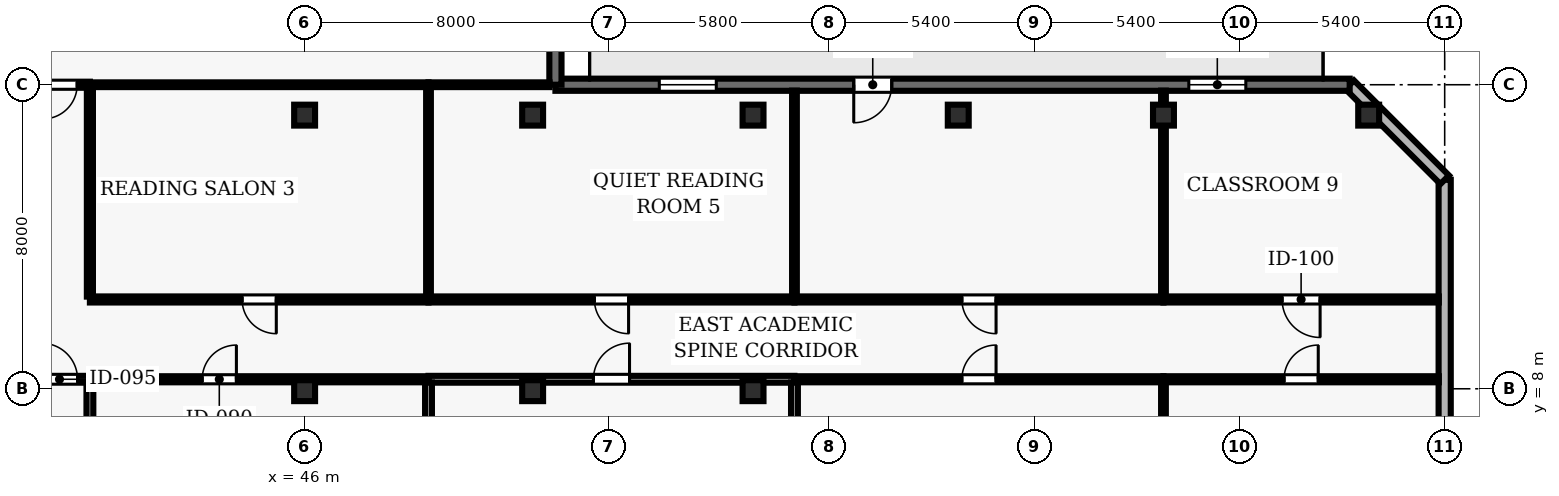
"""IFC4 building model, lengths in metres.
Left out: names, types, materials, properties, quantities, classifications, styles, units other than length and angle.
Written with IfcOpenShell. Run it as: python <this file> out.ifc"""

import sys

from ifc_helpers import new_model, si_unit, direction, frame, frame_2d, origin, origin_2d, place, context, subcontext, project, spatial, rectangle, hollow_rectangle, extrude, element, fill, save


model = new_model("IFC4")
c1 = context("Model", 3, precision=1e-05, world=origin(), true_north=direction((0.0, 1.0)))
c2 = subcontext(c1, "Body", "Model", "MODEL_VIEW")
j1 = project(units=[si_unit("LENGTHUNIT", "METRE"), si_unit("PLANEANGLEUNIT", "RADIAN")], contexts=[c1])
p1 = place(None, origin())
s1 = spatial("IfcSite", under=j1, at=p1, CompositionType="ELEMENT")
p2 = place(p1, origin())
s2 = spatial("IfcBuilding", under=s1, at=p2, CompositionType="ELEMENT")
p3 = place(p2, frame((0.0, 0.0, 58.3)))
s3 = spatial("IfcBuildingStorey", under=s2, at=p3, CompositionType="ELEMENT", Elevation=58.3)
for number, where, z_axis, x_axis in (
    (1, (46.0, 7.95, 0.0), (0.0, 0.0, 1.0), (1.0, 0.0, 0.0)),
    (2, (46.0, 15.2, 0.0), (0.0, 0.0, 1.0), (1.0, 0.0, 0.0)),
    (3, (52.0, 7.95, 0.0), (0.0, 0.0, 1.0), (1.0, 0.0, 0.0)),
    (4, (52.0, 15.2, 0.0), (0.0, 0.0, 1.0), (1.0, 0.0, 0.0)),
    (5, (57.8, 7.95, 0.0), (0.0, 0.0, 1.0), (1.0, 0.0, 0.0)),
    (6, (57.8, 15.2, 0.0), (0.0, 0.0, 1.0), (1.0, 0.0, 0.0)),
    (7, (63.2, 15.2, 0.0), (0.0, 0.0, 1.0), (1.0, 0.0, 0.0)),
    (8, (68.6, 15.2, 0.0), (0.0, 0.0, 1.0), (1.0, 0.0, 0.0)),
    (9, (74.0, 15.2, 0.0), (0.0, 0.0, 1.0), (1.0, 0.0, 0.0)),
):
    element("IfcColumn", number, at=place(p3, frame(where, z_axis=z_axis, x_axis=x_axis)), inside=s3, PredefinedType="COLUMN", context=c2, shape_type="SweptSolid", body=[
        extrude(hollow_rectangle(XDim=0.55, YDim=0.55, WallThickness=0.025, at=origin_2d()), origin(), (0.0, 0.0, 1.0), 3.9),
    ])
p4 = place(p3, frame((76.0, 2.5, 0.0), z_axis=(0.0, 0.0, 1.0), x_axis=(0.0, 1.0, 0.0)))
e10 = element("IfcWall", 10, at=p4, inside=s3, PredefinedType="SOLIDWALL", context=c2, shape_type="SweptSolid", body=[
    extrude(rectangle(XDim=11.0, YDim=0.32, at=frame_2d((5.5, 0.0))), origin(), (0.0, 0.0, 1.0), 3.69),
])
p5 = place(p4, frame((1.7, 0.0, 0.9)))
e11 = element("IfcOpeningElement", 11, at=p5, cuts=e10, PredefinedType="OPENING", context=c2, shape_type="SweptSolid", body=[
    extrude(rectangle(XDim=2.1, YDim=1.6, at=frame_2d((1.05, 0.8))), frame((0.0, 0.17, 0.0), z_axis=(0.0, -1.0, 0.0), x_axis=(1.0, 0.0, 0.0)), (0.0, 0.0, 1.0), 0.34),
])
p6 = place(p3, frame((76.0, 13.5, 0.0), z_axis=(0.0, 0.0, 1.0), x_axis=(-0.707106781187, 0.707106781187, 0.0)))
e12 = element("IfcWall", 12, at=p6, inside=s3, PredefinedType="SOLIDWALL", context=c2, shape_type="SweptSolid", body=[
    extrude(rectangle(XDim=3.536, YDim=0.32, at=frame_2d((1.768, 0.0))), origin(), (0.0, 0.0, 1.0), 3.69),
])
p7 = place(p3, frame((73.5, 16.0, 0.0), z_axis=(0.0, 0.0, 1.0), x_axis=(-1.0, 0.0, 0.0)))
e13 = element("IfcWall", 13, at=p7, inside=s3, PredefinedType="SOLIDWALL", context=c2, shape_type="SweptSolid", body=[
    extrude(rectangle(XDim=20.9, YDim=0.32, at=frame_2d((10.45, 0.0))), origin(), (0.0, 0.0, 1.0), 3.69),
])
p8 = place(p7, frame((12.05, 0.0, 0.0)))
e14 = element("IfcOpeningElement", 14, at=p8, cuts=e13, PredefinedType="OPENING", context=c2, shape_type="SweptSolid", body=[
    extrude(rectangle(XDim=1.0, YDim=2.2, at=frame_2d((0.5, 1.1))), frame((0.0, 0.17, 0.0), z_axis=(0.0, -1.0, 0.0), x_axis=(1.0, 0.0, 0.0)), (0.0, 0.0, 1.0), 0.34),
])
p9 = place(p7, frame((2.733, 0.0, 0.9)))
e15 = element("IfcOpeningElement", 15, at=p9, cuts=e13, PredefinedType="OPENING", context=c2, shape_type="SweptSolid", body=[
    extrude(rectangle(XDim=1.5, YDim=1.8, at=frame_2d((0.75, 0.9))), frame((0.0, 0.17, 0.0), z_axis=(0.0, -1.0, 0.0), x_axis=(1.0, 0.0, 0.0)), (0.0, 0.0, 1.0), 0.34),
])
p10 = place(p7, frame((16.667, 0.0, 0.9)))
e16 = element("IfcOpeningElement", 16, at=p10, cuts=e13, PredefinedType="OPENING", context=c2, shape_type="SweptSolid", body=[
    extrude(rectangle(XDim=1.5, YDim=1.8, at=frame_2d((0.75, 0.9))), frame((0.0, 0.17, 0.0), z_axis=(0.0, -1.0, 0.0), x_axis=(1.0, 0.0, 0.0)), (0.0, 0.0, 1.0), 0.34),
])
p11 = place(p3, frame((52.6, 16.0, 0.0), z_axis=(0.0, 0.0, 1.0), x_axis=(0.0, 1.0, 0.0)))
e17 = element("IfcWall", 17, at=p11, inside=s3, PredefinedType="SOLIDWALL", context=c2, shape_type="SweptSolid", body=[
    extrude(rectangle(XDim=10.095, YDim=0.32, at=frame_2d((5.047, 0.0))), origin(), (0.0, 0.0, 1.0), 3.69),
])
p12 = place(p11, frame((4.147, 0.0, 0.9)))
e18 = element("IfcOpeningElement", 18, at=p12, cuts=e17, PredefinedType="OPENING", context=c2, shape_type="SweptSolid", body=[
    extrude(rectangle(XDim=1.8, YDim=1.8, at=frame_2d((0.9, 0.9))), frame((0.0, 0.17, 0.0), z_axis=(0.0, -1.0, 0.0), x_axis=(1.0, 0.0, 0.0)), (0.0, 0.0, 1.0), 0.34),
])
p13 = place(p3, frame((38.05, 8.25, 0.0), z_axis=(0.0, 0.0, 1.0), x_axis=(1.0, 0.0, 0.0)))
e19 = element("IfcWall", 19, at=p13, inside=s3, PredefinedType="PARTITIONING", context=c2, shape_type="SweptSolid", body=[
    extrude(rectangle(XDim=2.3, YDim=0.18, at=frame_2d((1.15, 0.0))), origin(), (0.0, 0.0, 1.0), 3.055),
])
p14 = place(p13, frame((1.025, 0.0, 0.0)))
e20 = element("IfcOpeningElement", 20, at=p14, cuts=e19, PredefinedType="OPENING", context=c2, shape_type="SweptSolid", body=[
    extrude(rectangle(XDim=0.95, YDim=2.1, at=frame_2d((0.475, 1.05))), frame((0.0, 0.1, 0.0), z_axis=(0.0, -1.0, 0.0), x_axis=(1.0, 0.0, 0.0)), (0.0, 0.0, 1.0), 0.2),
])
p15 = place(p3, frame((40.35, 8.25, 0.0), z_axis=(0.0, 0.0, 1.0), x_axis=(1.0, 0.0, 0.0)))
e21 = element("IfcWall", 21, at=p15, inside=s3, PredefinedType="PARTITIONING", context=c2, shape_type="SweptSolid", body=[
    extrude(rectangle(XDim=8.91, YDim=0.16, at=frame_2d((4.455, 0.0))), origin(), (0.0, 0.0, 1.0), 3.055),
])
p16 = place(p15, frame((2.955, 0.0, 0.0)))
e22 = element("IfcOpeningElement", 22, at=p16, cuts=e21, PredefinedType="OPENING", context=c2, shape_type="SweptSolid", body=[
    extrude(rectangle(XDim=0.9, YDim=2.1, at=frame_2d((0.45, 1.05))), frame((0.0, 0.09, 0.0), z_axis=(0.0, -1.0, 0.0), x_axis=(1.0, 0.0, 0.0)), (0.0, 0.0, 1.0), 0.18),
])
p17 = place(p3, frame((40.35, 16.0, 0.0), z_axis=(0.0, 0.0, 1.0), x_axis=(-1.0, 0.0, 0.0)))
e23 = element("IfcWall", 23, at=p17, inside=s3, PredefinedType="PARTITIONING", context=c2, shape_type="SweptSolid", body=[
    extrude(rectangle(XDim=2.27, YDim=0.16, at=frame_2d((1.135, 0.0))), origin(), (0.0, 0.0, 1.0), 3.69),
])
p18 = place(p17, frame((0.335, 0.0, 0.0)))
e24 = element("IfcOpeningElement", 24, at=p18, cuts=e23, PredefinedType="OPENING", context=c2, shape_type="SweptSolid", body=[
    extrude(rectangle(XDim=0.9, YDim=2.1, at=frame_2d((0.45, 1.05))), frame((0.0, 0.09, 0.0), z_axis=(0.0, -1.0, 0.0), x_axis=(1.0, 0.0, 0.0)), (0.0, 0.0, 1.0), 0.18),
])
p19 = place(p3, frame((49.26, 8.25, 0.0), z_axis=(0.0, 0.0, 1.0), x_axis=(1.0, 0.0, 0.0)))
e25 = element("IfcWall", 25, at=p19, inside=s3, PredefinedType="PARTITIONING", context=c2, shape_type="SweptSolid", body=[
    extrude(rectangle(XDim=9.63, YDim=0.18, at=frame_2d((4.815, 0.0))), origin(), (0.0, 0.0, 1.0), 3.055),
])
p20 = place(p19, frame((4.34, 0.0, 0.0)))
e26 = element("IfcOpeningElement", 26, at=p20, cuts=e25, PredefinedType="OPENING", context=c2, shape_type="SweptSolid", body=[
    extrude(rectangle(XDim=0.95, YDim=2.1, at=frame_2d((0.475, 1.05))), frame((0.0, 0.1, 0.0), z_axis=(0.0, -1.0, 0.0), x_axis=(1.0, 0.0, 0.0)), (0.0, 0.0, 1.0), 0.2),
])
p21 = place(p3, frame((49.26, 10.35, 0.0), z_axis=(0.0, 0.0, 1.0), x_axis=(-1.0, 0.0, 0.0)))
e27 = element("IfcWall", 27, at=p21, inside=s3, PredefinedType="PARTITIONING", context=c2, shape_type="SweptSolid", body=[
    extrude(rectangle(XDim=8.91, YDim=0.16, at=frame_2d((4.455, 0.0))), origin(), (0.0, 0.0, 1.0), 3.277),
])
p22 = place(p21, frame((4.005, 0.0, 0.0)))
e28 = element("IfcOpeningElement", 28, at=p22, cuts=e27, PredefinedType="OPENING", context=c2, shape_type="SweptSolid", body=[
    extrude(rectangle(XDim=0.9, YDim=2.1, at=frame_2d((0.45, 1.05))), frame((0.0, 0.09, 0.0), z_axis=(0.0, -1.0, 0.0), x_axis=(1.0, 0.0, 0.0)), (0.0, 0.0, 1.0), 0.18),
])
p23 = place(p3, frame((49.26, 16.0, 0.0), z_axis=(0.0, 0.0, 1.0), x_axis=(1.0, 0.0, 0.0)))
e29 = element("IfcWall", 29, at=p23, inside=s3, PredefinedType="PARTITIONING", context=c2, shape_type="SweptSolid", body=[
    extrude(rectangle(XDim=3.185, YDim=0.125, at=frame_2d((1.593, 0.0))), origin(), (0.0, 0.0, 1.0), 3.39),
])
p24 = place(p3, frame((49.26, 16.0, 0.0), z_axis=(0.0, 0.0, 1.0), x_axis=(-1.0, 0.0, 0.0)))
e30 = element("IfcWall", 30, at=p24, inside=s3, PredefinedType="PARTITIONING", context=c2, shape_type="SweptSolid", body=[
    extrude(rectangle(XDim=8.91, YDim=0.125, at=frame_2d((4.455, 0.0))), origin(), (0.0, 0.0, 1.0), 3.39),
])
p25 = place(p3, frame((58.89, 8.25, 0.0), z_axis=(0.0, 0.0, 1.0), x_axis=(1.0, 0.0, 0.0)))
e31 = element("IfcWall", 31, at=p25, inside=s3, PredefinedType="PARTITIONING", context=c2, shape_type="SweptSolid", body=[
    extrude(rectangle(XDim=9.71, YDim=0.16, at=frame_2d((4.855, 0.0))), origin(), (0.0, 0.0, 1.0), 3.69),
])
p26 = place(p25, frame((4.405, 0.0, 0.0)))
e32 = element("IfcOpeningElement", 32, at=p26, cuts=e31, PredefinedType="OPENING", context=c2, shape_type="SweptSolid", body=[
    extrude(rectangle(XDim=0.9, YDim=2.1, at=frame_2d((0.45, 1.05))), frame((0.0, 0.09, 0.0), z_axis=(0.0, -1.0, 0.0), x_axis=(1.0, 0.0, 0.0)), (0.0, 0.0, 1.0), 0.18),
])
p27 = place(p3, frame((58.89, 10.35, 0.0), z_axis=(0.0, 0.0, 1.0), x_axis=(-1.0, 0.0, 0.0)))
e33 = element("IfcWall", 33, at=p27, inside=s3, PredefinedType="PARTITIONING", context=c2, shape_type="SweptSolid", body=[
    extrude(rectangle(XDim=9.63, YDim=0.16, at=frame_2d((4.815, 0.0))), origin(), (0.0, 0.0, 1.0), 3.277),
])
p28 = place(p27, frame((4.365, 0.0, 0.0)))
e34 = element("IfcOpeningElement", 34, at=p28, cuts=e33, PredefinedType="OPENING", context=c2, shape_type="SweptSolid", body=[
    extrude(rectangle(XDim=0.9, YDim=2.1, at=frame_2d((0.45, 1.05))), frame((0.0, 0.09, 0.0), z_axis=(0.0, -1.0, 0.0), x_axis=(1.0, 0.0, 0.0)), (0.0, 0.0, 1.0), 0.18),
])
p29 = place(p3, frame((68.6, 8.25, 0.0), z_axis=(0.0, 0.0, 1.0), x_axis=(1.0, 0.0, 0.0)))
e35 = element("IfcWall", 35, at=p29, inside=s3, PredefinedType="PARTITIONING", context=c2, shape_type="SweptSolid", body=[
    extrude(rectangle(XDim=7.245, YDim=0.16, at=frame_2d((3.623, 0.0))), origin(), (0.0, 0.0, 1.0), 3.69),
])
p30 = place(p29, frame((3.173, 0.0, 0.0)))
e36 = element("IfcOpeningElement", 36, at=p30, cuts=e35, PredefinedType="OPENING", context=c2, shape_type="SweptSolid", body=[
    extrude(rectangle(XDim=0.9, YDim=2.1, at=frame_2d((0.45, 1.05))), frame((0.0, 0.09, 0.0), z_axis=(0.0, -1.0, 0.0), x_axis=(1.0, 0.0, 0.0)), (0.0, 0.0, 1.0), 0.18),
])
p31 = place(p3, frame((68.6, 10.35, 0.0), z_axis=(0.0, 0.0, 1.0), x_axis=(-1.0, 0.0, 0.0)))
e37 = element("IfcWall", 37, at=p31, inside=s3, PredefinedType="PARTITIONING", context=c2, shape_type="SweptSolid", body=[
    extrude(rectangle(XDim=9.71, YDim=0.16, at=frame_2d((4.855, 0.0))), origin(), (0.0, 0.0, 1.0), 3.277),
])
p32 = place(p31, frame((4.405, 0.0, 0.0)))
e38 = element("IfcOpeningElement", 38, at=p32, cuts=e37, PredefinedType="OPENING", context=c2, shape_type="SweptSolid", body=[
    extrude(rectangle(XDim=0.9, YDim=2.1, at=frame_2d((0.45, 1.05))), frame((0.0, 0.09, 0.0), z_axis=(0.0, -1.0, 0.0), x_axis=(1.0, 0.0, 0.0)), (0.0, 0.0, 1.0), 0.18),
])
p33 = place(p3, frame((75.845, 10.35, 0.0), z_axis=(0.0, 0.0, 1.0), x_axis=(-1.0, 0.0, 0.0)))
e39 = element("IfcWall", 39, at=p33, inside=s3, PredefinedType="PARTITIONING", context=c2, shape_type="SweptSolid", body=[
    extrude(rectangle(XDim=7.245, YDim=0.16, at=frame_2d((3.623, 0.0))), origin(), (0.0, 0.0, 1.0), 3.69),
])
p34 = place(p33, frame((3.123, 0.0, 0.0)))
e40 = element("IfcOpeningElement", 40, at=p34, cuts=e39, PredefinedType="OPENING", context=c2, shape_type="SweptSolid", body=[
    extrude(rectangle(XDim=1.0, YDim=2.1, at=frame_2d((0.5, 1.05))), frame((0.0, 0.09, 0.0), z_axis=(0.0, -1.0, 0.0), x_axis=(1.0, 0.0, 0.0)), (0.0, 0.0, 1.0), 0.18),
])
p35 = place(p3, frame((40.35, 0.155, 0.0), z_axis=(0.0, 0.0, 1.0), x_axis=(0.0, 1.0, 0.0)))
e41 = element("IfcWall", 41, at=p35, inside=s3, PredefinedType="PARTITIONING", context=c2, shape_type="SweptSolid", body=[
    extrude(rectangle(XDim=8.01, YDim=0.18, at=frame_2d((4.005, 0.0))), origin(), (0.0, 0.0, 1.0), 3.69),
])
p36 = place(p3, frame((40.35, 10.425, 0.0), z_axis=(0.0, 0.0, 1.0), x_axis=(0.0, 1.0, 0.0)))
e42 = element("IfcWall", 42, at=p36, inside=s3, PredefinedType="PARTITIONING", context=c2, shape_type="SweptSolid", body=[
    extrude(rectangle(XDim=5.5, YDim=0.16, at=frame_2d((2.75, 0.0))), origin(), (0.0, 0.0, 1.0), 3.277),
])
p37 = place(p3, frame((49.26, 0.155, 0.0), z_axis=(0.0, 0.0, 1.0), x_axis=(0.0, 1.0, 0.0)))
e43 = element("IfcWall", 43, at=p37, inside=s3, PredefinedType="PARTITIONING", context=c2, shape_type="SweptSolid", body=[
    extrude(rectangle(XDim=8.01, YDim=0.18, at=frame_2d((4.005, 0.0))), origin(), (0.0, 0.0, 1.0), 3.69),
])
p38 = place(p3, frame((49.26, 10.425, 0.0), z_axis=(0.0, 0.0, 1.0), x_axis=(0.0, 1.0, 0.0)))
e44 = element("IfcWall", 44, at=p38, inside=s3, PredefinedType="PARTITIONING", context=c2, shape_type="SweptSolid", body=[
    extrude(rectangle(XDim=5.518, YDim=0.125, at=frame_2d((2.759, 0.0))), origin(), (0.0, 0.0, 1.0), 3.69),
])
p39 = place(p3, frame((58.89, 0.155, 0.0), z_axis=(0.0, 0.0, 1.0), x_axis=(0.0, 1.0, 0.0)))
e45 = element("IfcWall", 45, at=p39, inside=s3, PredefinedType="PARTITIONING", context=c2, shape_type="SweptSolid", body=[
    extrude(rectangle(XDim=8.01, YDim=0.18, at=frame_2d((4.005, 0.0))), origin(), (0.0, 0.0, 1.0), 3.69),
])
p40 = place(p3, frame((58.89, 10.425, 0.0), z_axis=(0.0, 0.0, 1.0), x_axis=(0.0, 1.0, 0.0)))
e46 = element("IfcWall", 46, at=p40, inside=s3, PredefinedType="PARTITIONING", context=c2, shape_type="SweptSolid", body=[
    extrude(rectangle(XDim=5.42, YDim=0.125, at=frame_2d((2.71, 0.0))), origin(), (0.0, 0.0, 1.0), 3.69),
])
p41 = place(p3, frame((68.6, 0.155, 0.0), z_axis=(0.0, 0.0, 1.0), x_axis=(0.0, 1.0, 0.0)))
e47 = element("IfcWall", 47, at=p41, inside=s3, PredefinedType="PARTITIONING", context=c2, shape_type="SweptSolid", body=[
    extrude(rectangle(XDim=8.02, YDim=0.125, at=frame_2d((4.01, 0.0))), origin(), (0.0, 0.0, 1.0), 3.055),
])
p42 = place(p3, frame((68.6, 10.425, 0.0), z_axis=(0.0, 0.0, 1.0), x_axis=(0.0, 1.0, 0.0)))
e48 = element("IfcWall", 48, at=p42, inside=s3, PredefinedType="PARTITIONING", context=c2, shape_type="SweptSolid", body=[
    extrude(rectangle(XDim=5.42, YDim=0.125, at=frame_2d((2.71, 0.0))), origin(), (0.0, 0.0, 1.0), 3.055),
])
p43 = place(p8, origin())
e49 = element("IfcDoor", 49, at=p43, inside=s3, OperationType="SINGLE_SWING_RIGHT", PredefinedType="DOOR", context=c2, shape_type="SweptSolid", body=[
    extrude(rectangle(XDim=1.0, YDim=2.2, at=frame_2d((0.5, 1.1))), frame((0.0, 0.025, 0.0), z_axis=(0.0, -1.0, 0.0), x_axis=(1.0, 0.0, 0.0)), (0.0, 0.0, 1.0), 0.05),
])
fill(e14, e49)
p44 = place(p9, origin())
e50 = element("IfcWindow", 50, at=p44, inside=s3, PartitioningType="SINGLE_PANEL", PredefinedType="WINDOW", context=c2, shape_type="SweptSolid", body=[
    extrude(rectangle(XDim=1.5, YDim=1.8, at=frame_2d((0.75, 0.9))), frame((0.0, 0.03, 0.0), z_axis=(0.0, -1.0, 0.0), x_axis=(1.0, 0.0, 0.0)), (0.0, 0.0, 1.0), 0.06),
])
fill(e15, e50)
p45 = place(p10, origin())
e51 = element("IfcWindow", 51, at=p45, inside=s3, PartitioningType="SINGLE_PANEL", PredefinedType="WINDOW", context=c2, shape_type="SweptSolid", body=[
    extrude(rectangle(XDim=1.5, YDim=1.8, at=frame_2d((0.75, 0.9))), frame((0.0, 0.03, 0.0), z_axis=(0.0, -1.0, 0.0), x_axis=(1.0, 0.0, 0.0)), (0.0, 0.0, 1.0), 0.06),
])
fill(e16, e51)
p46 = place(p14, origin())
e52 = element("IfcDoor", 52, at=p46, inside=s3, OperationType="SINGLE_SWING_LEFT", PredefinedType="DOOR", context=c2, shape_type="SweptSolid", body=[
    extrude(rectangle(XDim=0.95, YDim=2.1, at=frame_2d((0.475, 1.05))), frame((0.0, 0.025, 0.0), z_axis=(0.0, -1.0, 0.0), x_axis=(1.0, 0.0, 0.0)), (0.0, 0.0, 1.0), 0.05),
])
fill(e20, e52)
p47 = place(p16, origin())
e53 = element("IfcDoor", 53, at=p47, inside=s3, OperationType="SINGLE_SWING_RIGHT", PredefinedType="DOOR", context=c2, shape_type="SweptSolid", body=[
    extrude(rectangle(XDim=0.9, YDim=2.1, at=frame_2d((0.45, 1.05))), frame((0.0, 0.025, 0.0), z_axis=(0.0, -1.0, 0.0), x_axis=(1.0, 0.0, 0.0)), (0.0, 0.0, 1.0), 0.05),
])
fill(e22, e53)
p48 = place(p22, origin())
e54 = element("IfcDoor", 54, at=p48, inside=s3, OperationType="SINGLE_SWING_LEFT", PredefinedType="DOOR", context=c2, shape_type="SweptSolid", body=[
    extrude(rectangle(XDim=0.9, YDim=2.1, at=frame_2d((0.45, 1.05))), frame((0.0, 0.025, 0.0), z_axis=(0.0, -1.0, 0.0), x_axis=(1.0, 0.0, 0.0)), (0.0, 0.0, 1.0), 0.05),
])
fill(e28, e54)
p49 = place(p20, origin())
e55 = element("IfcDoor", 55, at=p49, inside=s3, OperationType="SINGLE_SWING_RIGHT", PredefinedType="DOOR", context=c2, shape_type="SweptSolid", body=[
    extrude(rectangle(XDim=0.95, YDim=2.1, at=frame_2d((0.475, 1.05))), frame((0.0, 0.025, 0.0), z_axis=(0.0, -1.0, 0.0), x_axis=(1.0, 0.0, 0.0)), (0.0, 0.0, 1.0), 0.05),
])
fill(e26, e55)
p50 = place(p28, origin())
e56 = element("IfcDoor", 56, at=p50, inside=s3, OperationType="SINGLE_SWING_LEFT", PredefinedType="DOOR", context=c2, shape_type="SweptSolid", body=[
    extrude(rectangle(XDim=0.9, YDim=2.1, at=frame_2d((0.45, 1.05))), frame((0.0, 0.025, 0.0), z_axis=(0.0, -1.0, 0.0), x_axis=(1.0, 0.0, 0.0)), (0.0, 0.0, 1.0), 0.05),
])
fill(e34, e56)
p51 = place(p26, origin())
e57 = element("IfcDoor", 57, at=p51, inside=s3, OperationType="SINGLE_SWING_RIGHT", PredefinedType="DOOR", context=c2, shape_type="SweptSolid", body=[
    extrude(rectangle(XDim=0.9, YDim=2.1, at=frame_2d((0.45, 1.05))), frame((0.0, 0.025, 0.0), z_axis=(0.0, -1.0, 0.0), x_axis=(1.0, 0.0, 0.0)), (0.0, 0.0, 1.0), 0.05),
])
fill(e32, e57)
p52 = place(p32, origin())
e58 = element("IfcDoor", 58, at=p52, inside=s3, OperationType="SINGLE_SWING_LEFT", PredefinedType="DOOR", context=c2, shape_type="SweptSolid", body=[
    extrude(rectangle(XDim=0.9, YDim=2.1, at=frame_2d((0.45, 1.05))), frame((0.0, 0.025, 0.0), z_axis=(0.0, -1.0, 0.0), x_axis=(1.0, 0.0, 0.0)), (0.0, 0.0, 1.0), 0.05),
])
fill(e38, e58)
p53 = place(p30, origin())
e59 = element("IfcDoor", 59, at=p53, inside=s3, OperationType="SINGLE_SWING_RIGHT", PredefinedType="DOOR", context=c2, shape_type="SweptSolid", body=[
    extrude(rectangle(XDim=0.9, YDim=2.1, at=frame_2d((0.45, 1.05))), frame((0.0, 0.025, 0.0), z_axis=(0.0, -1.0, 0.0), x_axis=(1.0, 0.0, 0.0)), (0.0, 0.0, 1.0), 0.05),
])
fill(e36, e59)
p54 = place(p34, origin())
e60 = element("IfcDoor", 60, at=p54, inside=s3, OperationType="SINGLE_SWING_LEFT", PredefinedType="DOOR", context=c2, shape_type="SweptSolid", body=[
    extrude(rectangle(XDim=1.0, YDim=2.1, at=frame_2d((0.5, 1.05))), frame((0.0, 0.025, 0.0), z_axis=(0.0, -1.0, 0.0), x_axis=(1.0, 0.0, 0.0)), (0.0, 0.0, 1.0), 0.05),
])
fill(e40, e60)
p55 = place(p18, origin())
e61 = element("IfcDoor", 61, at=p55, inside=s3, OperationType="SINGLE_SWING_RIGHT", PredefinedType="DOOR", context=c2, shape_type="SweptSolid", body=[
    extrude(rectangle(XDim=0.9, YDim=2.1, at=frame_2d((0.45, 1.05))), frame((0.0, 0.025, 0.0), z_axis=(0.0, -1.0, 0.0), x_axis=(1.0, 0.0, 0.0)), (0.0, 0.0, 1.0), 0.05),
])
fill(e24, e61)
save(model, sys.argv[1])
